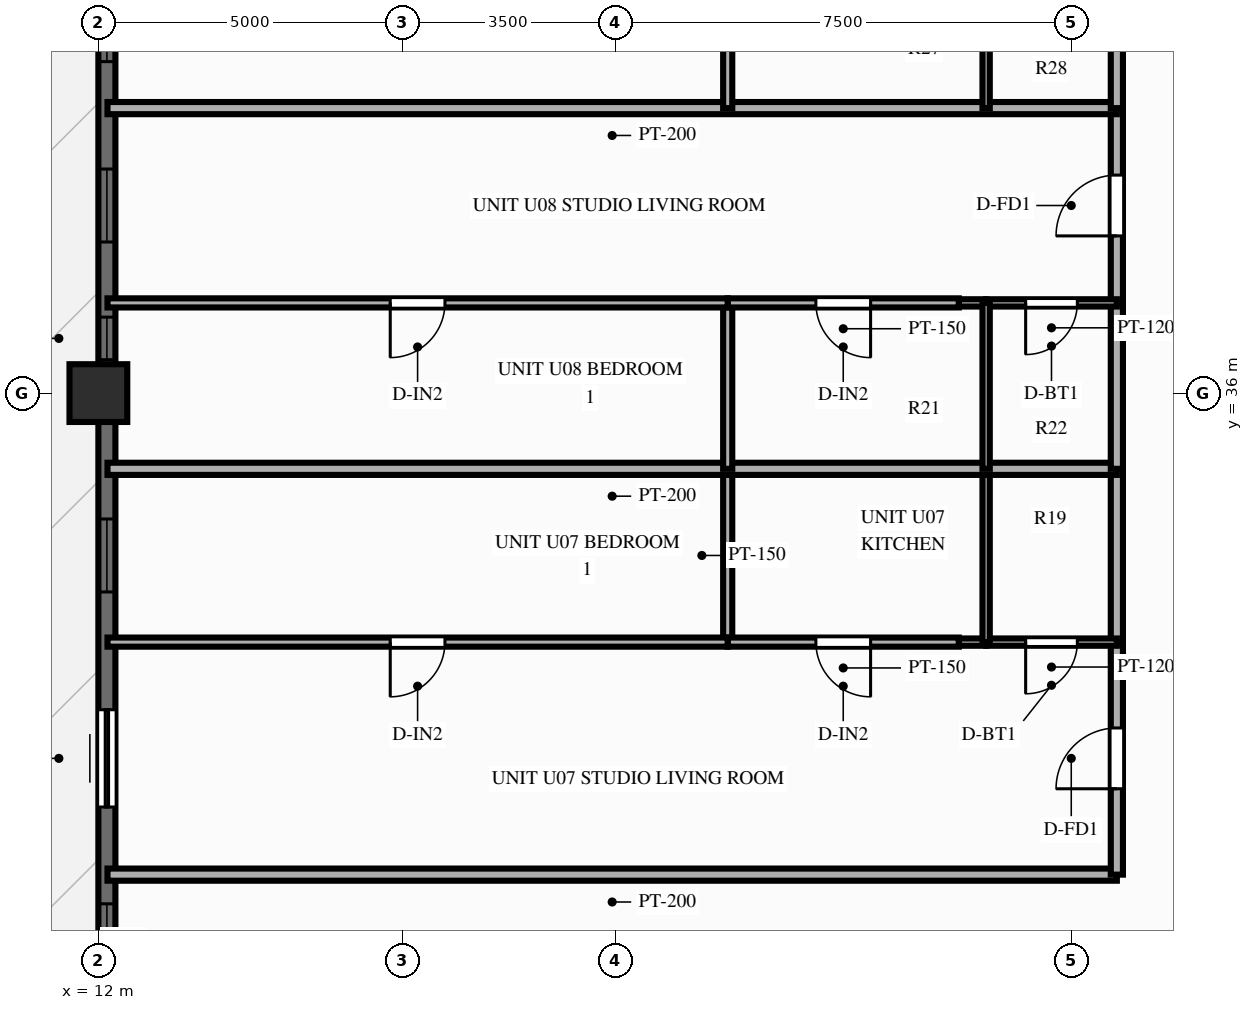
"""IFC4 building model, lengths in metres.
Left out: names, types, materials, properties, quantities, classifications, styles, units other than length and angle.
Written with IfcOpenShell. Run it as: python <this file> out.ifc"""

import sys

from ifc_helpers import new_model, si_unit, direction, frame, frame_2d, origin, origin_2d, place, context, subcontext, project, spatial, rectangle, extrude, source, transform, mapped, element, fill, save


model = new_model("IFC4")
c1 = context("Model", 3, precision=1e-05, world=origin(), true_north=direction((0.0, 1.0)))
c2 = subcontext(c1, "Body", "Model", "MODEL_VIEW")
j1 = project(units=[si_unit("LENGTHUNIT", "METRE"), si_unit("PLANEANGLEUNIT", "RADIAN")], contexts=[c1])
p1 = place(None, origin())
s1 = spatial("IfcSite", under=j1, at=p1, CompositionType="ELEMENT")
p2 = place(p1, origin())
s2 = spatial("IfcBuilding", under=s1, at=p2, CompositionType="ELEMENT")
p3 = place(p2, frame((0.0, 0.0, 119.85)))
s3 = spatial("IfcBuildingStorey", under=s2, at=p3, CompositionType="ELEMENT", Elevation=119.85)
m1 = source(origin(), c2, "Body", "SweptSolid", [
    extrude(rectangle(XDim=0.95, YDim=0.95, at=origin_2d()), origin(), (0.0, 0.0, 1.0), 3.0),
])
p4 = place(p3, frame((12.0, 36.0, 0.0), z_axis=(0.0, 0.0, 1.0), x_axis=(1.0, 0.0, 0.0)))
e1 = element("IfcColumn", 1, at=p4, inside=s3, PredefinedType="COLUMN", context=c2, shape_type="MappedRepresentation", body=[
    mapped(m1, transform((0.0, 0.0, 0.0), scale=1.0)),
])
p5 = place(p3, frame((12.14, 7.2, 0.0), z_axis=(0.0, 0.0, 1.0), x_axis=(0.0, 1.0, 0.0)))
e2 = element("IfcWall", 2, at=p5, inside=s3, PredefinedType="SOLIDWALL", context=c2, shape_type="SweptSolid", body=[
    extrude(rectangle(XDim=39.6, YDim=0.28, at=frame_2d((19.8, 0.0))), origin(), (0.0, 0.0, 1.0), 2.28),
])
p6 = place(p5, frame((0.945, 0.0, 0.25)))
e3 = element("IfcOpeningElement", 3, at=p6, cuts=e2, PredefinedType="OPENING", context=c2, shape_type="SweptSolid", body=[
    extrude(rectangle(XDim=1.2, YDim=1.5, at=frame_2d((0.6, 0.75))), frame((0.0, 0.152, 0.0), z_axis=(0.0, -1.0, 0.0), x_axis=(1.0, 0.0, 0.0)), (0.0, 0.0, 1.0), 0.304),
])
p7 = place(p5, frame((4.213, 0.0, 0.25)))
e4 = element("IfcOpeningElement", 4, at=p7, cuts=e2, PredefinedType="OPENING", context=c2, shape_type="SweptSolid", body=[
    extrude(rectangle(XDim=1.2, YDim=1.5, at=frame_2d((0.6, 0.75))), frame((0.0, 0.152, 0.0), z_axis=(0.0, -1.0, 0.0), x_axis=(1.0, 0.0, 0.0)), (0.0, 0.0, 1.0), 0.304),
])
p8 = place(p5, frame((7.55, 0.0, 0.25)))
e5 = element("IfcOpeningElement", 5, at=p8, cuts=e2, PredefinedType="OPENING", context=c2, shape_type="SweptSolid", body=[
    extrude(rectangle(XDim=1.2, YDim=1.5, at=frame_2d((0.6, 0.75))), frame((0.0, 0.152, 0.0), z_axis=(0.0, -1.0, 0.0), x_axis=(1.0, 0.0, 0.0)), (0.0, 0.0, 1.0), 0.304),
])
p9 = place(p5, frame((13.483, 0.0, 0.25)))
e6 = element("IfcOpeningElement", 6, at=p9, cuts=e2, PredefinedType="OPENING", context=c2, shape_type="SweptSolid", body=[
    extrude(rectangle(XDim=1.2, YDim=1.5, at=frame_2d((0.6, 0.75))), frame((0.0, 0.152, 0.0), z_axis=(0.0, -1.0, 0.0), x_axis=(1.0, 0.0, 0.0)), (0.0, 0.0, 1.0), 0.304),
])
p10 = place(p5, frame((16.82, 0.0, 0.25)))
e7 = element("IfcOpeningElement", 7, at=p10, cuts=e2, PredefinedType="OPENING", context=c2, shape_type="SweptSolid", body=[
    extrude(rectangle(XDim=1.2, YDim=1.5, at=frame_2d((0.6, 0.75))), frame((0.0, 0.152, 0.0), z_axis=(0.0, -1.0, 0.0), x_axis=(1.0, 0.0, 0.0)), (0.0, 0.0, 1.0), 0.304),
])
p11 = place(p5, frame((19.2, 0.0, 0.25)))
e8 = element("IfcOpeningElement", 8, at=p11, cuts=e2, PredefinedType="OPENING", context=c2, shape_type="SweptSolid", body=[
    extrude(rectangle(XDim=1.2, YDim=1.5, at=frame_2d((0.6, 0.75))), frame((0.0, 0.152, 0.0), z_axis=(0.0, -1.0, 0.0), x_axis=(1.0, 0.0, 0.0)), (0.0, 0.0, 1.0), 0.304),
])
p12 = place(p5, frame((21.992, 0.0, 0.0)))
e9 = element("IfcOpeningElement", 9, at=p12, cuts=e2, PredefinedType="OPENING", context=c2, shape_type="SweptSolid", body=[
    extrude(rectangle(XDim=1.6, YDim=2.15, at=frame_2d((0.8, 1.075))), frame((0.0, 0.152, 0.0), z_axis=(0.0, -1.0, 0.0), x_axis=(1.0, 0.0, 0.0)), (0.0, 0.0, 1.0), 0.304),
])
p13 = place(p5, frame((25.529, 0.0, 0.25)))
e10 = element("IfcOpeningElement", 10, at=p13, cuts=e2, PredefinedType="OPENING", context=c2, shape_type="SweptSolid", body=[
    extrude(rectangle(XDim=1.2, YDim=1.5, at=frame_2d((0.6, 0.75))), frame((0.0, 0.152, 0.0), z_axis=(0.0, -1.0, 0.0), x_axis=(1.0, 0.0, 0.0)), (0.0, 0.0, 1.0), 0.304),
])
p14 = place(p5, frame((29.349, 0.0, 0.25)))
e11 = element("IfcOpeningElement", 11, at=p14, cuts=e2, PredefinedType="OPENING", context=c2, shape_type="SweptSolid", body=[
    extrude(rectangle(XDim=0.7, YDim=1.5, at=frame_2d((0.35, 0.75))), frame((0.0, 0.152, 0.0), z_axis=(0.0, -1.0, 0.0), x_axis=(1.0, 0.0, 0.0)), (0.0, 0.0, 1.0), 0.304),
])
p15 = place(p5, frame((31.285, 0.0, 0.25)))
e12 = element("IfcOpeningElement", 12, at=p15, cuts=e2, PredefinedType="OPENING", context=c2, shape_type="SweptSolid", body=[
    extrude(rectangle(XDim=1.2, YDim=1.5, at=frame_2d((0.6, 0.75))), frame((0.0, 0.152, 0.0), z_axis=(0.0, -1.0, 0.0), x_axis=(1.0, 0.0, 0.0)), (0.0, 0.0, 1.0), 0.304),
])
p16 = place(p5, frame((34.252, 0.0, 0.25)))
e13 = element("IfcOpeningElement", 13, at=p16, cuts=e2, PredefinedType="OPENING", context=c2, shape_type="SweptSolid", body=[
    extrude(rectangle(XDim=1.2, YDim=1.5, at=frame_2d((0.6, 0.75))), frame((0.0, 0.152, 0.0), z_axis=(0.0, -1.0, 0.0), x_axis=(1.0, 0.0, 0.0)), (0.0, 0.0, 1.0), 0.304),
])
p17 = place(p5, frame((37.151, 0.0, 0.25)))
e14 = element("IfcOpeningElement", 14, at=p17, cuts=e2, PredefinedType="OPENING", context=c2, shape_type="SweptSolid", body=[
    extrude(rectangle(XDim=1.2, YDim=1.5, at=frame_2d((0.6, 0.75))), frame((0.0, 0.152, 0.0), z_axis=(0.0, -1.0, 0.0), x_axis=(1.0, 0.0, 0.0)), (0.0, 0.0, 1.0), 0.304),
])
p18 = place(p3, frame((28.75, 28.08, 0.0), z_axis=(0.0, 0.0, 1.0), x_axis=(-1.0, 0.0, 0.0)))
e15 = element("IfcWall", 15, at=p18, inside=s3, PredefinedType="PARTITIONING", context=c2, shape_type="SweptSolid", body=[
    extrude(rectangle(XDim=16.6, YDim=0.2, at=frame_2d((8.3, 0.0))), origin(), (0.0, 0.0, 1.0), 2.79),
])
p19 = place(p3, frame((28.75, 28.08, 0.0), z_axis=(0.0, 0.0, 1.0), x_axis=(0.0, 1.0, 0.0)))
e16 = element("IfcWall", 16, at=p19, inside=s3, PredefinedType="PARTITIONING", context=c2, shape_type="SweptSolid", body=[
    extrude(rectangle(XDim=3.824, YDim=0.2, at=frame_2d((1.912, 0.0))), origin(), (0.0, 0.0, 1.0), 2.79),
])
p20 = place(p19, frame((1.412, 0.0, 0.0)))
e17 = element("IfcOpeningElement", 17, at=p20, cuts=e16, PredefinedType="OPENING", context=c2, shape_type="SweptSolid", body=[
    extrude(rectangle(XDim=1.0, YDim=2.15, at=frame_2d((0.5, 1.075))), frame((0.0, 0.112, 0.0), z_axis=(0.0, -1.0, 0.0), x_axis=(1.0, 0.0, 0.0)), (0.0, 0.0, 1.0), 0.224),
])
p21 = place(p3, frame((28.75, 31.904, 0.0), z_axis=(0.0, 0.0, 1.0), x_axis=(0.0, 1.0, 0.0)))
e18 = element("IfcWall", 18, at=p21, inside=s3, PredefinedType="PARTITIONING", context=c2, shape_type="SweptSolid", body=[
    extrude(rectangle(XDim=2.85, YDim=0.2, at=frame_2d((1.425, 0.0))), origin(), (0.0, 0.0, 1.0), 2.79),
])
p22 = place(p3, frame((28.75, 31.904, 0.0), z_axis=(0.0, 0.0, 1.0), x_axis=(-1.0, 0.0, 0.0)))
e19 = element("IfcWall", 19, at=p22, inside=s3, PredefinedType="PARTITIONING", context=c2, shape_type="SweptSolid", body=[
    extrude(rectangle(XDim=2.15, YDim=0.12, at=frame_2d((1.075, 0.0))), origin(), (0.0, 0.0, 1.0), 2.79),
])
p23 = place(p22, frame((0.65, 0.0, 0.0)))
e20 = element("IfcOpeningElement", 20, at=p23, cuts=e19, PredefinedType="OPENING", context=c2, shape_type="SweptSolid", body=[
    extrude(rectangle(XDim=0.85, YDim=2.05, at=frame_2d((0.425, 1.025))), frame((0.0, 0.072, 0.0), z_axis=(0.0, -1.0, 0.0), x_axis=(1.0, 0.0, 0.0)), (0.0, 0.0, 1.0), 0.144),
])
p24 = place(p3, frame((26.6, 31.904, 0.0), z_axis=(0.0, 0.0, 1.0), x_axis=(-1.0, 0.0, 0.0)))
e21 = element("IfcWall", 21, at=p24, inside=s3, PredefinedType="PARTITIONING", context=c2, shape_type="SweptSolid", body=[
    extrude(rectangle(XDim=0.45, YDim=0.12, at=frame_2d((0.225, 0.0))), origin(), (0.0, 0.0, 1.0), 2.79),
])
p25 = place(p3, frame((26.6, 31.904, 0.0), z_axis=(0.0, 0.0, 1.0), x_axis=(0.0, 1.0, 0.0)))
e22 = element("IfcWall", 22, at=p25, inside=s3, PredefinedType="PARTITIONING", context=c2, shape_type="SweptSolid", body=[
    extrude(rectangle(XDim=2.85, YDim=0.12, at=frame_2d((1.425, 0.0))), origin(), (0.0, 0.0, 1.0), 2.79),
])
p26 = place(p3, frame((22.35, 31.904, 0.0), z_axis=(0.0, 0.0, 1.0), x_axis=(0.0, 1.0, 0.0)))
e23 = element("IfcWall", 23, at=p26, inside=s3, PredefinedType="PARTITIONING", context=c2, shape_type="SweptSolid", body=[
    extrude(rectangle(XDim=2.85, YDim=0.15, at=frame_2d((1.425, 0.0))), origin(), (0.0, 0.0, 1.0), 2.79),
])
p27 = place(p3, frame((26.15, 31.904, 0.0), z_axis=(0.0, 0.0, 1.0), x_axis=(-1.0, 0.0, 0.0)))
e24 = element("IfcWall", 24, at=p27, inside=s3, PredefinedType="PARTITIONING", context=c2, shape_type="SweptSolid", body=[
    extrude(rectangle(XDim=3.8, YDim=0.15, at=frame_2d((1.9, 0.0))), origin(), (0.0, 0.0, 1.0), 2.79),
])
p28 = place(p27, frame((1.45, 0.0, 0.0)))
e25 = element("IfcOpeningElement", 25, at=p28, cuts=e24, PredefinedType="OPENING", context=c2, shape_type="SweptSolid", body=[
    extrude(rectangle(XDim=0.9, YDim=2.1, at=frame_2d((0.45, 1.05))), frame((0.0, 0.087, 0.0), z_axis=(0.0, -1.0, 0.0), x_axis=(1.0, 0.0, 0.0)), (0.0, 0.0, 1.0), 0.174),
])
p29 = place(p3, frame((22.35, 31.904, 0.0), z_axis=(0.0, 0.0, 1.0), x_axis=(-1.0, 0.0, 0.0)))
e26 = element("IfcWall", 26, at=p29, inside=s3, PredefinedType="PARTITIONING", context=c2, shape_type="SweptSolid", body=[
    extrude(rectangle(XDim=10.2, YDim=0.15, at=frame_2d((5.1, 0.0))), origin(), (0.0, 0.0, 1.0), 2.79),
])
p30 = place(p29, frame((4.65, 0.0, 0.0)))
e27 = element("IfcOpeningElement", 27, at=p30, cuts=e26, PredefinedType="OPENING", context=c2, shape_type="SweptSolid", body=[
    extrude(rectangle(XDim=0.9, YDim=2.1, at=frame_2d((0.45, 1.05))), frame((0.0, 0.087, 0.0), z_axis=(0.0, -1.0, 0.0), x_axis=(1.0, 0.0, 0.0)), (0.0, 0.0, 1.0), 0.174),
])
p31 = place(p3, frame((28.75, 34.754, 0.0), z_axis=(0.0, 0.0, 1.0), x_axis=(-1.0, 0.0, 0.0)))
e28 = element("IfcWall", 28, at=p31, inside=s3, PredefinedType="PARTITIONING", context=c2, shape_type="SweptSolid", body=[
    extrude(rectangle(XDim=16.6, YDim=0.2, at=frame_2d((8.3, 0.0))), origin(), (0.0, 0.0, 1.0), 2.79),
])
p32 = place(p3, frame((28.75, 34.754, 0.0), z_axis=(0.0, 0.0, 1.0), x_axis=(0.0, 1.0, 0.0)))
e29 = element("IfcWall", 29, at=p32, inside=s3, PredefinedType="PARTITIONING", context=c2, shape_type="SweptSolid", body=[
    extrude(rectangle(XDim=2.729, YDim=0.2, at=frame_2d((1.365, 0.0))), origin(), (0.0, 0.0, 1.0), 2.79),
])
p33 = place(p3, frame((28.75, 37.483, 0.0), z_axis=(0.0, 0.0, 1.0), x_axis=(0.0, 1.0, 0.0)))
e30 = element("IfcWall", 30, at=p33, inside=s3, PredefinedType="PARTITIONING", context=c2, shape_type="SweptSolid", body=[
    extrude(rectangle(XDim=3.204, YDim=0.2, at=frame_2d((1.602, 0.0))), origin(), (0.0, 0.0, 1.0), 2.79),
])
p34 = place(p33, frame((1.102, 0.0, 0.0)))
e31 = element("IfcOpeningElement", 31, at=p34, cuts=e30, PredefinedType="OPENING", context=c2, shape_type="SweptSolid", body=[
    extrude(rectangle(XDim=1.0, YDim=2.15, at=frame_2d((0.5, 1.075))), frame((0.0, 0.112, 0.0), z_axis=(0.0, -1.0, 0.0), x_axis=(1.0, 0.0, 0.0)), (0.0, 0.0, 1.0), 0.224),
])
p35 = place(p3, frame((28.75, 37.483, 0.0), z_axis=(0.0, 0.0, 1.0), x_axis=(-1.0, 0.0, 0.0)))
e32 = element("IfcWall", 32, at=p35, inside=s3, PredefinedType="PARTITIONING", context=c2, shape_type="SweptSolid", body=[
    extrude(rectangle(XDim=2.15, YDim=0.12, at=frame_2d((1.075, 0.0))), origin(), (0.0, 0.0, 1.0), 2.79),
])
p36 = place(p35, frame((0.65, 0.0, 0.0)))
e33 = element("IfcOpeningElement", 33, at=p36, cuts=e32, PredefinedType="OPENING", context=c2, shape_type="SweptSolid", body=[
    extrude(rectangle(XDim=0.85, YDim=2.05, at=frame_2d((0.425, 1.025))), frame((0.0, 0.072, 0.0), z_axis=(0.0, -1.0, 0.0), x_axis=(1.0, 0.0, 0.0)), (0.0, 0.0, 1.0), 0.144),
])
p37 = place(p3, frame((26.6, 37.483, 0.0), z_axis=(0.0, 0.0, 1.0), x_axis=(-1.0, 0.0, 0.0)))
e34 = element("IfcWall", 34, at=p37, inside=s3, PredefinedType="PARTITIONING", context=c2, shape_type="SweptSolid", body=[
    extrude(rectangle(XDim=0.45, YDim=0.12, at=frame_2d((0.225, 0.0))), origin(), (0.0, 0.0, 1.0), 2.79),
])
p38 = place(p3, frame((26.6, 34.754, 0.0), z_axis=(0.0, 0.0, 1.0), x_axis=(0.0, 1.0, 0.0)))
e35 = element("IfcWall", 35, at=p38, inside=s3, PredefinedType="PARTITIONING", context=c2, shape_type="SweptSolid", body=[
    extrude(rectangle(XDim=2.729, YDim=0.12, at=frame_2d((1.365, 0.0))), origin(), (0.0, 0.0, 1.0), 2.79),
])
p39 = place(p3, frame((22.35, 34.754, 0.0), z_axis=(0.0, 0.0, 1.0), x_axis=(0.0, 1.0, 0.0)))
e36 = element("IfcWall", 36, at=p39, inside=s3, PredefinedType="PARTITIONING", context=c2, shape_type="SweptSolid", body=[
    extrude(rectangle(XDim=2.729, YDim=0.15, at=frame_2d((1.365, 0.0))), origin(), (0.0, 0.0, 1.0), 2.79),
])
p40 = place(p3, frame((26.15, 37.483, 0.0), z_axis=(0.0, 0.0, 1.0), x_axis=(-1.0, 0.0, 0.0)))
e37 = element("IfcWall", 37, at=p40, inside=s3, PredefinedType="PARTITIONING", context=c2, shape_type="SweptSolid", body=[
    extrude(rectangle(XDim=3.8, YDim=0.15, at=frame_2d((1.9, 0.0))), origin(), (0.0, 0.0, 1.0), 2.79),
])
p41 = place(p40, frame((1.45, 0.0, 0.0)))
e38 = element("IfcOpeningElement", 38, at=p41, cuts=e37, PredefinedType="OPENING", context=c2, shape_type="SweptSolid", body=[
    extrude(rectangle(XDim=0.9, YDim=2.1, at=frame_2d((0.45, 1.05))), frame((0.0, 0.087, 0.0), z_axis=(0.0, -1.0, 0.0), x_axis=(1.0, 0.0, 0.0)), (0.0, 0.0, 1.0), 0.174),
])
p42 = place(p3, frame((22.35, 37.483, 0.0), z_axis=(0.0, 0.0, 1.0), x_axis=(-1.0, 0.0, 0.0)))
e39 = element("IfcWall", 39, at=p42, inside=s3, PredefinedType="PARTITIONING", context=c2, shape_type="SweptSolid", body=[
    extrude(rectangle(XDim=10.2, YDim=0.15, at=frame_2d((5.1, 0.0))), origin(), (0.0, 0.0, 1.0), 2.79),
])
p43 = place(p42, frame((4.65, 0.0, 0.0)))
e40 = element("IfcOpeningElement", 40, at=p43, cuts=e39, PredefinedType="OPENING", context=c2, shape_type="SweptSolid", body=[
    extrude(rectangle(XDim=0.9, YDim=2.1, at=frame_2d((0.45, 1.05))), frame((0.0, 0.087, 0.0), z_axis=(0.0, -1.0, 0.0), x_axis=(1.0, 0.0, 0.0)), (0.0, 0.0, 1.0), 0.174),
])
p44 = place(p3, frame((28.75, 40.687, 0.0), z_axis=(0.0, 0.0, 1.0), x_axis=(-1.0, 0.0, 0.0)))
e41 = element("IfcWall", 41, at=p44, inside=s3, PredefinedType="PARTITIONING", context=c2, shape_type="SweptSolid", body=[
    extrude(rectangle(XDim=16.6, YDim=0.2, at=frame_2d((8.3, 0.0))), origin(), (0.0, 0.0, 1.0), 2.79),
])
p45 = place(p3, frame((28.75, 40.687, 0.0), z_axis=(0.0, 0.0, 1.0), x_axis=(0.0, 1.0, 0.0)))
e42 = element("IfcWall", 42, at=p45, inside=s3, PredefinedType="PARTITIONING", context=c2, shape_type="SweptSolid", body=[
    extrude(rectangle(XDim=2.729, YDim=0.2, at=frame_2d((1.365, 0.0))), origin(), (0.0, 0.0, 1.0), 2.79),
])
p46 = place(p3, frame((26.6, 40.687, 0.0), z_axis=(0.0, 0.0, 1.0), x_axis=(0.0, 1.0, 0.0)))
e43 = element("IfcWall", 43, at=p46, inside=s3, PredefinedType="PARTITIONING", context=c2, shape_type="SweptSolid", body=[
    extrude(rectangle(XDim=2.729, YDim=0.12, at=frame_2d((1.365, 0.0))), origin(), (0.0, 0.0, 1.0), 2.79),
])
p47 = place(p3, frame((22.35, 40.687, 0.0), z_axis=(0.0, 0.0, 1.0), x_axis=(0.0, 1.0, 0.0)))
e44 = element("IfcWall", 44, at=p47, inside=s3, PredefinedType="PARTITIONING", context=c2, shape_type="SweptSolid", body=[
    extrude(rectangle(XDim=2.729, YDim=0.15, at=frame_2d((1.365, 0.0))), origin(), (0.0, 0.0, 1.0), 2.79),
])
m2 = source(origin(), c2, "Body", "SweptSolid", [
    extrude(rectangle(XDim=1.2, YDim=1.5, at=frame_2d((0.6, 0.75))), frame((0.0, 0.03, 0.0), z_axis=(0.0, -1.0, 0.0), x_axis=(1.0, 0.0, 0.0)), (0.0, 0.0, 1.0), 0.06),
])
p48 = place(p11, origin())
e45 = element("IfcWindow", 45, at=p48, inside=s3, PartitioningType="SINGLE_PANEL", PredefinedType="WINDOW", context=c2, shape_type="MappedRepresentation", body=[
    mapped(m2, transform((0.0, 0.0, 0.0), scale=1.0)),
])
fill(e8, e45)
m3 = source(origin(), c2, "Body", "SweptSolid", [
    extrude(rectangle(XDim=1.6, YDim=2.15, at=frame_2d((0.8, 1.075))), frame((0.0, 0.025, 0.0), z_axis=(0.0, -1.0, 0.0), x_axis=(1.0, 0.0, 0.0)), (0.0, 0.0, 1.0), 0.05),
])
p49 = place(p12, origin())
e46 = element("IfcDoor", 46, at=p49, inside=s3, OperationType="SLIDING_TO_LEFT", PredefinedType="DOOR", context=c2, shape_type="MappedRepresentation", body=[
    mapped(m3, transform((0.0, 0.0, 0.0), scale=1.0)),
])
fill(e9, e46)
p50 = place(p13, origin())
e47 = element("IfcWindow", 47, at=p50, inside=s3, PartitioningType="SINGLE_PANEL", PredefinedType="WINDOW", context=c2, shape_type="MappedRepresentation", body=[
    mapped(m2, transform((0.0, 0.0, 0.0), scale=1.0)),
])
fill(e10, e47)
m4 = source(origin(), c2, "Body", "SweptSolid", [
    extrude(rectangle(XDim=0.7, YDim=1.5, at=frame_2d((0.35, 0.75))), frame((0.0, 0.03, 0.0), z_axis=(0.0, -1.0, 0.0), x_axis=(1.0, 0.0, 0.0)), (0.0, 0.0, 1.0), 0.06),
])
p51 = place(p14, origin())
e48 = element("IfcWindow", 48, at=p51, inside=s3, PartitioningType="SINGLE_PANEL", PredefinedType="WINDOW", context=c2, shape_type="MappedRepresentation", body=[
    mapped(m4, transform((0.0, 0.0, 0.0), scale=1.0)),
])
fill(e11, e48)
p52 = place(p15, origin())
e49 = element("IfcWindow", 49, at=p52, inside=s3, PartitioningType="SINGLE_PANEL", PredefinedType="WINDOW", context=c2, shape_type="MappedRepresentation", body=[
    mapped(m2, transform((0.0, 0.0, 0.0), scale=1.0)),
])
fill(e12, e49)
p53 = place(p16, origin())
e50 = element("IfcWindow", 50, at=p53, inside=s3, PartitioningType="SINGLE_PANEL", PredefinedType="WINDOW", context=c2, shape_type="MappedRepresentation", body=[
    mapped(m2, transform((0.0, 0.0, 0.0), scale=1.0)),
])
fill(e13, e50)
m5 = source(origin(), c2, "Body", "SweptSolid", [
    extrude(rectangle(XDim=1.0, YDim=2.15, at=frame_2d((0.5, 1.075))), frame((0.0, 0.025, 0.0), z_axis=(0.0, -1.0, 0.0), x_axis=(1.0, 0.0, 0.0)), (0.0, 0.0, 1.0), 0.05),
])
p54 = place(p20, origin())
e51 = element("IfcDoor", 51, at=p54, inside=s3, OperationType="SINGLE_SWING_LEFT", PredefinedType="DOOR", context=c2, shape_type="MappedRepresentation", body=[
    mapped(m5, transform((0.0, 0.0, 0.0), scale=1.0)),
])
fill(e17, e51)
m6 = source(origin(), c2, "Body", "SweptSolid", [
    extrude(rectangle(XDim=0.85, YDim=2.05, at=frame_2d((0.425, 1.025))), frame((0.0, 0.025, 0.0), z_axis=(0.0, -1.0, 0.0), x_axis=(1.0, 0.0, 0.0)), (0.0, 0.0, 1.0), 0.05),
])
p55 = place(p23, origin())
e52 = element("IfcDoor", 52, at=p55, inside=s3, OperationType="SINGLE_SWING_RIGHT", PredefinedType="DOOR", context=c2, shape_type="MappedRepresentation", body=[
    mapped(m6, transform((0.0, 0.0, 0.0), scale=1.0)),
])
fill(e20, e52)
m7 = source(origin(), c2, "Body", "SweptSolid", [
    extrude(rectangle(XDim=0.9, YDim=2.1, at=frame_2d((0.45, 1.05))), frame((0.0, 0.025, 0.0), z_axis=(0.0, -1.0, 0.0), x_axis=(1.0, 0.0, 0.0)), (0.0, 0.0, 1.0), 0.05),
])
p56 = place(p28, origin())
e53 = element("IfcDoor", 53, at=p56, inside=s3, OperationType="SINGLE_SWING_LEFT", PredefinedType="DOOR", context=c2, shape_type="MappedRepresentation", body=[
    mapped(m7, transform((0.0, 0.0, 0.0), scale=1.0)),
])
fill(e25, e53)
p57 = place(p30, origin())
e54 = element("IfcDoor", 54, at=p57, inside=s3, OperationType="SINGLE_SWING_RIGHT", PredefinedType="DOOR", context=c2, shape_type="MappedRepresentation", body=[
    mapped(m7, transform((0.0, 0.0, 0.0), scale=1.0)),
])
fill(e27, e54)
p58 = place(p34, origin())
e55 = element("IfcDoor", 55, at=p58, inside=s3, OperationType="SINGLE_SWING_LEFT", PredefinedType="DOOR", context=c2, shape_type="MappedRepresentation", body=[
    mapped(m5, transform((0.0, 0.0, 0.0), scale=1.0)),
])
fill(e31, e55)
p59 = place(p36, origin())
e56 = element("IfcDoor", 56, at=p59, inside=s3, OperationType="SINGLE_SWING_RIGHT", PredefinedType="DOOR", context=c2, shape_type="MappedRepresentation", body=[
    mapped(m6, transform((0.0, 0.0, 0.0), scale=1.0)),
])
fill(e33, e56)
p60 = place(p41, origin())
e57 = element("IfcDoor", 57, at=p60, inside=s3, OperationType="SINGLE_SWING_LEFT", PredefinedType="DOOR", context=c2, shape_type="MappedRepresentation", body=[
    mapped(m7, transform((0.0, 0.0, 0.0), scale=1.0)),
])
fill(e38, e57)
p61 = place(p43, origin())
e58 = element("IfcDoor", 58, at=p61, inside=s3, OperationType="SINGLE_SWING_RIGHT", PredefinedType="DOOR", context=c2, shape_type="MappedRepresentation", body=[
    mapped(m7, transform((0.0, 0.0, 0.0), scale=1.0)),
])
fill(e40, e58)
save(model, sys.argv[1])
